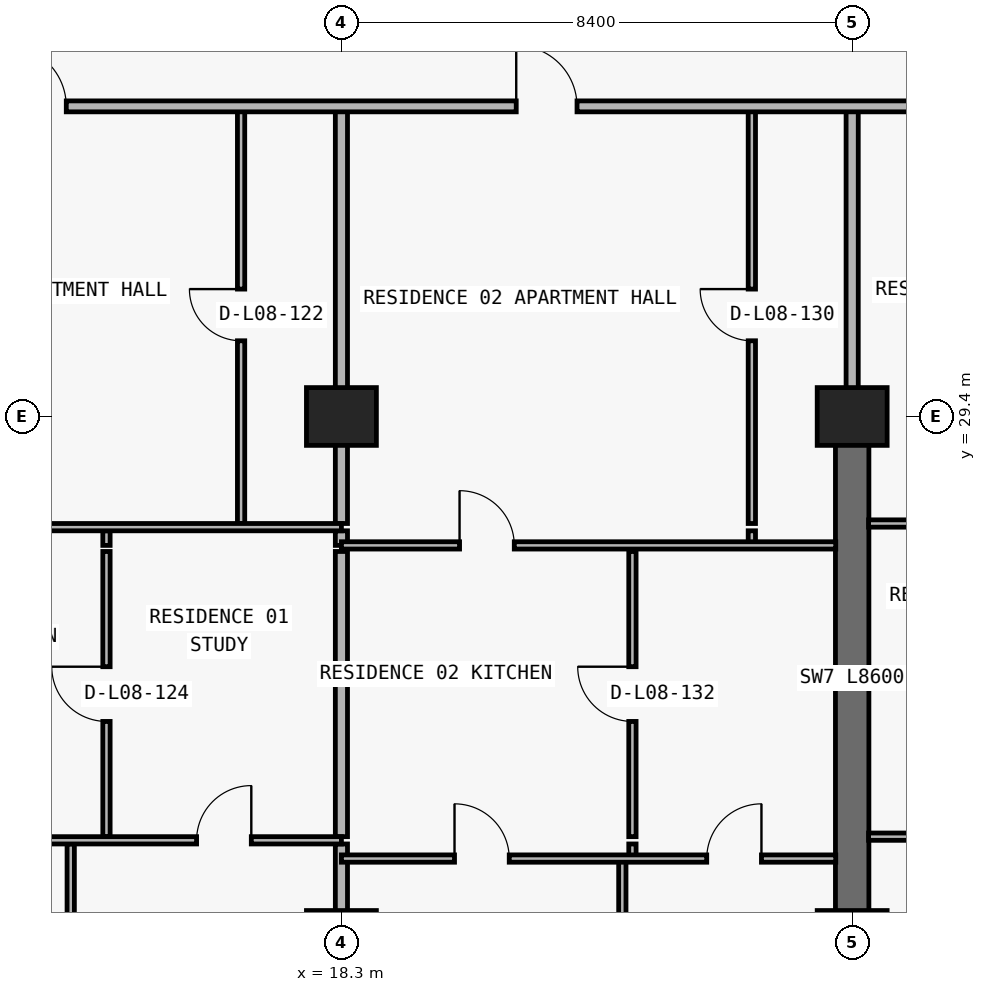
"""IFC4 building model, lengths in metres.
Left out: names, types, materials, properties, quantities, classifications, styles, units other than length and angle.
Written with IfcOpenShell. Run it as: python <this file> out.ifc"""

import sys

from ifc_helpers import new_model, si_unit, direction, frame, frame_2d, origin, origin_2d, place, context, subcontext, project, spatial, rectangle, extrude, element, fill, save


model = new_model("IFC4")
c1 = context("Model", 3, precision=1e-05, world=origin(), true_north=direction((0.0, 1.0)))
c2 = subcontext(c1, "Body", "Model", "MODEL_VIEW")
j1 = project(units=[si_unit("LENGTHUNIT", "METRE"), si_unit("PLANEANGLEUNIT", "RADIAN")], contexts=[c1])
p1 = place(None, origin())
s1 = spatial("IfcSite", under=j1, at=p1, CompositionType="ELEMENT")
p2 = place(p1, origin())
s2 = spatial("IfcBuilding", under=s1, at=p2, CompositionType="ELEMENT")
p3 = place(p2, frame((0.0, 0.0, 36.6)))
s3 = spatial("IfcBuildingStorey", under=s2, at=p3, CompositionType="ELEMENT", Elevation=36.6)
for number, where, z_axis, x_axis in (
    (1, (18.3, 20.8, 0.0), (0.0, 0.0, 1.0), (1.0, 0.0, 0.0)),
    (2, (26.7, 20.8, 0.0), (0.0, 0.0, 1.0), (1.0, 0.0, 0.0)),
    (3, (18.3, 29.4, 0.0), (0.0, 0.0, 1.0), (1.0, 0.0, 0.0)),
    (4, (26.7, 29.4, 0.0), (0.0, 0.0, 1.0), (1.0, 0.0, 0.0)),
):
    element("IfcColumn", number, at=place(p3, frame(where, z_axis=z_axis, x_axis=x_axis)), inside=s3, PredefinedType="COLUMN", context=c2, shape_type="SweptSolid", body=[
        extrude(rectangle(XDim=1.15, YDim=0.95, at=origin_2d()), origin(), (0.0, 0.0, 1.0), 3.05),
    ])
p4 = place(p3, frame((26.7, 20.8, 0.0), z_axis=(0.0, 0.0, 1.0), x_axis=(0.0, 1.0, 0.0)))
e5 = element("IfcWall", 5, at=p4, inside=s3, PredefinedType="SHEAR", context=c2, shape_type="SweptSolid", body=[
    extrude(rectangle(XDim=8.6, YDim=0.55, at=frame_2d((4.3, 0.0))), origin(), (0.0, 0.0, 1.0), 3.05),
])
p5 = place(p3, frame((13.848, 6.24, 0.0), z_axis=(0.0, 0.0, 1.0), x_axis=(0.0, 1.0, 0.0)))
e6 = element("IfcWall", 6, at=p5, inside=s3, PredefinedType="PARTITIONING", context=c2, shape_type="SweptSolid", body=[
    extrude(rectangle(XDim=16.13, YDim=0.12, at=frame_2d((8.065, 0.0))), origin(), (0.0, 0.0, 1.0), 3.05),
])
p6 = place(p3, frame((14.436, 22.49, 0.0), z_axis=(0.0, 0.0, 1.0), x_axis=(0.0, 1.0, 0.0)))
e7 = element("IfcWall", 7, at=p6, inside=s3, PredefinedType="PARTITIONING", context=c2, shape_type="SweptSolid", body=[
    extrude(rectangle(XDim=4.69, YDim=0.12, at=frame_2d((2.345, 0.0))), origin(), (0.0, 0.0, 1.0), 3.05),
])
p7 = place(p6, frame((1.895, 0.0, 0.0)))
e8 = element("IfcOpeningElement", 8, at=p7, cuts=e7, PredefinedType="OPENING", context=c2, shape_type="SweptSolid", body=[
    extrude(rectangle(XDim=0.9, YDim=2.15, at=frame_2d((0.45, 1.075))), frame((0.0, 0.07, 0.0), z_axis=(0.0, -1.0, 0.0), x_axis=(1.0, 0.0, 0.0)), (0.0, 0.0, 1.0), 0.14),
])
p8 = place(p3, frame((14.436, 27.28, 0.0), z_axis=(0.0, 0.0, 1.0), x_axis=(0.0, 1.0, 0.0)))
e9 = element("IfcWall", 9, at=p8, inside=s3, PredefinedType="PARTITIONING", context=c2, shape_type="SweptSolid", body=[
    extrude(rectangle(XDim=0.24, YDim=0.12, at=frame_2d((0.12, 0.0))), origin(), (0.0, 0.0, 1.0), 3.05),
])
p9 = place(p3, frame((16.65, 27.64, 0.0), z_axis=(0.0, 0.0, 1.0), x_axis=(0.0, 1.0, 0.0)))
e10 = element("IfcWall", 10, at=p9, inside=s3, PredefinedType="PARTITIONING", context=c2, shape_type="SweptSolid", body=[
    extrude(rectangle(XDim=6.86, YDim=0.12, at=frame_2d((3.43, 0.0))), origin(), (0.0, 0.0, 1.0), 3.05),
])
p10 = place(p9, frame((3.005, 0.0, 0.0)))
e11 = element("IfcOpeningElement", 11, at=p10, cuts=e10, PredefinedType="OPENING", context=c2, shape_type="SweptSolid", body=[
    extrude(rectangle(XDim=0.85, YDim=2.1, at=frame_2d((0.425, 1.05))), frame((0.0, 0.07, 0.0), z_axis=(0.0, -1.0, 0.0), x_axis=(1.0, 0.0, 0.0)), (0.0, 0.0, 1.0), 0.14),
])
p11 = place(p3, frame((18.3, 6.24, 0.0), z_axis=(0.0, 0.0, 1.0), x_axis=(0.0, 1.0, 0.0)))
e12 = element("IfcWall", 12, at=p11, inside=s3, PredefinedType="PARTITIONING", context=c2, shape_type="SweptSolid", body=[
    extrude(rectangle(XDim=16.13, YDim=0.2, at=frame_2d((8.065, 0.0))), origin(), (0.0, 0.0, 1.0), 2.11),
])
p12 = place(p3, frame((18.3, 22.49, 0.0), z_axis=(0.0, 0.0, 1.0), x_axis=(0.0, 1.0, 0.0)))
e13 = element("IfcWall", 13, at=p12, inside=s3, PredefinedType="PARTITIONING", context=c2, shape_type="SweptSolid", body=[
    extrude(rectangle(XDim=4.69, YDim=0.2, at=frame_2d((2.345, 0.0))), origin(), (0.0, 0.0, 1.0), 2.11),
])
p13 = place(p3, frame((18.3, 27.28, 0.0), z_axis=(0.0, 0.0, 1.0), x_axis=(0.0, 1.0, 0.0)))
e14 = element("IfcWall", 14, at=p13, inside=s3, PredefinedType="PARTITIONING", context=c2, shape_type="SweptSolid", body=[
    extrude(rectangle(XDim=0.24, YDim=0.2, at=frame_2d((0.12, 0.0))), origin(), (0.0, 0.0, 1.0), 2.11),
])
p14 = place(p3, frame((18.3, 27.64, 0.0), z_axis=(0.0, 0.0, 1.0), x_axis=(0.0, 1.0, 0.0)))
e15 = element("IfcWall", 15, at=p14, inside=s3, PredefinedType="PARTITIONING", context=c2, shape_type="SweptSolid", body=[
    extrude(rectangle(XDim=6.86, YDim=0.2, at=frame_2d((3.43, 0.0))), origin(), (0.0, 0.0, 1.0), 2.11),
])
p15 = place(p3, frame((22.92, 6.24, 0.0), z_axis=(0.0, 0.0, 1.0), x_axis=(0.0, 1.0, 0.0)))
e16 = element("IfcWall", 16, at=p15, inside=s3, PredefinedType="PARTITIONING", context=c2, shape_type="SweptSolid", body=[
    extrude(rectangle(XDim=15.89, YDim=0.12, at=frame_2d((7.945, 0.0))), origin(), (0.0, 0.0, 1.0), 3.05),
])
p16 = place(p3, frame((23.086, 22.135, 0.0), z_axis=(0.0, 0.0, 1.0), x_axis=(0.0, 1.0, 0.0)))
e17 = element("IfcWall", 17, at=p16, inside=s3, PredefinedType="PARTITIONING", context=c2, shape_type="SweptSolid", body=[
    extrude(rectangle(XDim=0.235, YDim=0.12, at=frame_2d((0.118, 0.0))), origin(), (0.0, 0.0, 1.0), 3.05),
])
p17 = place(p3, frame((23.086, 22.49, 0.0), z_axis=(0.0, 0.0, 1.0), x_axis=(0.0, 1.0, 0.0)))
e18 = element("IfcWall", 18, at=p17, inside=s3, PredefinedType="PARTITIONING", context=c2, shape_type="SweptSolid", body=[
    extrude(rectangle(XDim=4.69, YDim=0.12, at=frame_2d((2.345, 0.0))), origin(), (0.0, 0.0, 1.0), 3.05),
])
p18 = place(p17, frame((1.895, 0.0, 0.0)))
e19 = element("IfcOpeningElement", 19, at=p18, cuts=e18, PredefinedType="OPENING", context=c2, shape_type="SweptSolid", body=[
    extrude(rectangle(XDim=0.9, YDim=2.15, at=frame_2d((0.45, 1.075))), frame((0.0, 0.07, 0.0), z_axis=(0.0, -1.0, 0.0), x_axis=(1.0, 0.0, 0.0)), (0.0, 0.0, 1.0), 0.14),
])
p19 = place(p3, frame((25.05, 27.28, 0.0), z_axis=(0.0, 0.0, 1.0), x_axis=(0.0, 1.0, 0.0)))
e20 = element("IfcWall", 20, at=p19, inside=s3, PredefinedType="PARTITIONING", context=c2, shape_type="SweptSolid", body=[
    extrude(rectangle(XDim=0.24, YDim=0.12, at=frame_2d((0.12, 0.0))), origin(), (0.0, 0.0, 1.0), 3.05),
])
p20 = place(p3, frame((25.05, 27.64, 0.0), z_axis=(0.0, 0.0, 1.0), x_axis=(0.0, 1.0, 0.0)))
e21 = element("IfcWall", 21, at=p20, inside=s3, PredefinedType="PARTITIONING", context=c2, shape_type="SweptSolid", body=[
    extrude(rectangle(XDim=6.86, YDim=0.12, at=frame_2d((3.43, 0.0))), origin(), (0.0, 0.0, 1.0), 3.05),
])
p21 = place(p20, frame((3.005, 0.0, 0.0)))
e22 = element("IfcOpeningElement", 22, at=p21, cuts=e21, PredefinedType="OPENING", context=c2, shape_type="SweptSolid", body=[
    extrude(rectangle(XDim=0.85, YDim=2.1, at=frame_2d((0.425, 1.05))), frame((0.0, 0.07, 0.0), z_axis=(0.0, -1.0, 0.0), x_axis=(1.0, 0.0, 0.0)), (0.0, 0.0, 1.0), 0.14),
])
p22 = place(p3, frame((26.7, 29.405, 0.0), z_axis=(0.0, 0.0, 1.0), x_axis=(0.0, 1.0, 0.0)))
e23 = element("IfcWall", 23, at=p22, inside=s3, PredefinedType="PARTITIONING", context=c2, shape_type="SweptSolid", body=[
    extrude(rectangle(XDim=5.095, YDim=0.2, at=frame_2d((2.547, 0.0))), origin(), (0.0, 0.0, 1.0), 2.335),
])
p23 = place(p3, frame((18.3, 22.13, 0.0), z_axis=(0.0, 0.0, 1.0), x_axis=(1.0, 0.0, 0.0)))
e24 = element("IfcWall", 24, at=p23, inside=s3, PredefinedType="PARTITIONING", context=c2, shape_type="SweptSolid", body=[
    extrude(rectangle(XDim=8.13, YDim=0.12, at=frame_2d((4.065, 0.0))), origin(), (0.0, 0.0, 1.0), 3.05),
])
p24 = place(p23, frame((1.86, 0.0, 0.0)))
e25 = element("IfcOpeningElement", 25, at=p24, cuts=e24, PredefinedType="OPENING", context=c2, shape_type="SweptSolid", body=[
    extrude(rectangle(XDim=0.9, YDim=2.15, at=frame_2d((0.45, 1.075))), frame((0.0, 0.07, 0.0), z_axis=(0.0, -1.0, 0.0), x_axis=(1.0, 0.0, 0.0)), (0.0, 0.0, 1.0), 0.14),
])
p25 = place(p23, frame((6.008, 0.0, 0.0)))
e26 = element("IfcOpeningElement", 26, at=p25, cuts=e24, PredefinedType="OPENING", context=c2, shape_type="SweptSolid", body=[
    extrude(rectangle(XDim=0.9, YDim=2.15, at=frame_2d((0.45, 1.075))), frame((0.0, 0.07, 0.0), z_axis=(0.0, -1.0, 0.0), x_axis=(1.0, 0.0, 0.0)), (0.0, 0.0, 1.0), 0.14),
])
p26 = place(p3, frame((9.9, 22.43, 0.0), z_axis=(0.0, 0.0, 1.0), x_axis=(1.0, 0.0, 0.0)))
e27 = element("IfcWall", 27, at=p26, inside=s3, PredefinedType="PARTITIONING", context=c2, shape_type="SweptSolid", body=[
    extrude(rectangle(XDim=8.4, YDim=0.12, at=frame_2d((4.2, 0.0))), origin(), (0.0, 0.0, 1.0), 3.05),
])
p27 = place(p26, frame((1.524, 0.0, 0.0)))
e28 = element("IfcOpeningElement", 28, at=p27, cuts=e27, PredefinedType="OPENING", context=c2, shape_type="SweptSolid", body=[
    extrude(rectangle(XDim=0.9, YDim=2.15, at=frame_2d((0.45, 1.075))), frame((0.0, 0.07, 0.0), z_axis=(0.0, -1.0, 0.0), x_axis=(1.0, 0.0, 0.0)), (0.0, 0.0, 1.0), 0.14),
])
p28 = place(p26, frame((6.018, 0.0, 0.0)))
e29 = element("IfcOpeningElement", 29, at=p28, cuts=e27, PredefinedType="OPENING", context=c2, shape_type="SweptSolid", body=[
    extrude(rectangle(XDim=0.9, YDim=2.15, at=frame_2d((0.45, 1.075))), frame((0.0, 0.07, 0.0), z_axis=(0.0, -1.0, 0.0), x_axis=(1.0, 0.0, 0.0)), (0.0, 0.0, 1.0), 0.14),
])
p29 = place(p3, frame((26.97, 22.49, 0.0), z_axis=(0.0, 0.0, 1.0), x_axis=(1.0, 0.0, 0.0)))
e30 = element("IfcWall", 30, at=p29, inside=s3, PredefinedType="PARTITIONING", context=c2, shape_type="SweptSolid", body=[
    extrude(rectangle(XDim=8.125, YDim=0.12, at=frame_2d((4.062, 0.0))), origin(), (0.0, 0.0, 1.0), 3.05),
])
p30 = place(p29, frame((1.389, 0.0, 0.0)))
e31 = element("IfcOpeningElement", 31, at=p30, cuts=e30, PredefinedType="OPENING", context=c2, shape_type="SweptSolid", body=[
    extrude(rectangle(XDim=0.9, YDim=2.15, at=frame_2d((0.45, 1.075))), frame((0.0, 0.07, 0.0), z_axis=(0.0, -1.0, 0.0), x_axis=(1.0, 0.0, 0.0)), (0.0, 0.0, 1.0), 0.14),
])
p31 = place(p29, frame((5.621, 0.0, 0.0)))
e32 = element("IfcOpeningElement", 32, at=p31, cuts=e30, PredefinedType="OPENING", context=c2, shape_type="SweptSolid", body=[
    extrude(rectangle(XDim=0.9, YDim=2.15, at=frame_2d((0.45, 1.075))), frame((0.0, 0.07, 0.0), z_axis=(0.0, -1.0, 0.0), x_axis=(1.0, 0.0, 0.0)), (0.0, 0.0, 1.0), 0.14),
])
p32 = place(p3, frame((18.3, 27.28, 0.0), z_axis=(0.0, 0.0, 1.0), x_axis=(1.0, 0.0, 0.0)))
e33 = element("IfcWall", 33, at=p32, inside=s3, PredefinedType="PARTITIONING", context=c2, shape_type="SweptSolid", body=[
    extrude(rectangle(XDim=8.13, YDim=0.12, at=frame_2d((4.065, 0.0))), origin(), (0.0, 0.0, 1.0), 3.05),
])
p33 = place(p32, frame((1.943, 0.0, 0.0)))
e34 = element("IfcOpeningElement", 34, at=p33, cuts=e33, PredefinedType="OPENING", context=c2, shape_type="SweptSolid", body=[
    extrude(rectangle(XDim=0.9, YDim=2.15, at=frame_2d((0.45, 1.075))), frame((0.0, 0.07, 0.0), z_axis=(0.0, -1.0, 0.0), x_axis=(1.0, 0.0, 0.0)), (0.0, 0.0, 1.0), 0.14),
])
p34 = place(p3, frame((9.9, 27.58, 0.0), z_axis=(0.0, 0.0, 1.0), x_axis=(1.0, 0.0, 0.0)))
e35 = element("IfcWall", 35, at=p34, inside=s3, PredefinedType="PARTITIONING", context=c2, shape_type="SweptSolid", body=[
    extrude(rectangle(XDim=8.4, YDim=0.12, at=frame_2d((4.2, 0.0))), origin(), (0.0, 0.0, 1.0), 3.05),
])
p35 = place(p34, frame((1.818, 0.0, 0.0)))
e36 = element("IfcOpeningElement", 36, at=p35, cuts=e35, PredefinedType="OPENING", context=c2, shape_type="SweptSolid", body=[
    extrude(rectangle(XDim=0.9, YDim=2.15, at=frame_2d((0.45, 1.075))), frame((0.0, 0.07, 0.0), z_axis=(0.0, -1.0, 0.0), x_axis=(1.0, 0.0, 0.0)), (0.0, 0.0, 1.0), 0.14),
])
p36 = place(p3, frame((26.97, 27.64, 0.0), z_axis=(0.0, 0.0, 1.0), x_axis=(1.0, 0.0, 0.0)))
e37 = element("IfcWall", 37, at=p36, inside=s3, PredefinedType="PARTITIONING", context=c2, shape_type="SweptSolid", body=[
    extrude(rectangle(XDim=8.13, YDim=0.12, at=frame_2d((4.065, 0.0))), origin(), (0.0, 0.0, 1.0), 3.05),
])
p37 = place(p36, frame((1.558, 0.0, 0.0)))
e38 = element("IfcOpeningElement", 38, at=p37, cuts=e37, PredefinedType="OPENING", context=c2, shape_type="SweptSolid", body=[
    extrude(rectangle(XDim=0.9, YDim=2.15, at=frame_2d((0.45, 1.075))), frame((0.0, 0.07, 0.0), z_axis=(0.0, -1.0, 0.0), x_axis=(1.0, 0.0, 0.0)), (0.0, 0.0, 1.0), 0.14),
])
p38 = place(p3, frame((5.105, 34.5, 0.0), z_axis=(0.0, 0.0, 1.0), x_axis=(1.0, 0.0, 0.0)))
e39 = element("IfcWall", 39, at=p38, inside=s3, PredefinedType="PARTITIONING", context=c2, shape_type="SweptSolid", body=[
    extrude(rectangle(XDim=50.781, YDim=0.18, at=frame_2d((25.391, 0.0))), origin(), (0.0, 0.0, 1.0), 3.05),
])
p39 = place(p38, frame((7.67, 0.0, 0.0)))
e40 = element("IfcOpeningElement", 40, at=p39, cuts=e39, PredefinedType="OPENING", context=c2, shape_type="SweptSolid", body=[
    extrude(rectangle(XDim=1.0, YDim=2.2, at=frame_2d((0.5, 1.1))), frame((0.0, 0.1, 0.0), z_axis=(0.0, -1.0, 0.0), x_axis=(1.0, 0.0, 0.0)), (0.0, 0.0, 1.0), 0.2),
])
p40 = place(p38, frame((16.07, 0.0, 0.0)))
e41 = element("IfcOpeningElement", 41, at=p40, cuts=e39, PredefinedType="OPENING", context=c2, shape_type="SweptSolid", body=[
    extrude(rectangle(XDim=1.0, YDim=2.2, at=frame_2d((0.5, 1.1))), frame((0.0, 0.1, 0.0), z_axis=(0.0, -1.0, 0.0), x_axis=(1.0, 0.0, 0.0)), (0.0, 0.0, 1.0), 0.2),
])
p41 = place(p38, frame((24.47, 0.0, 0.0)))
e42 = element("IfcOpeningElement", 42, at=p41, cuts=e39, PredefinedType="OPENING", context=c2, shape_type="SweptSolid", body=[
    extrude(rectangle(XDim=1.0, YDim=2.2, at=frame_2d((0.5, 1.1))), frame((0.0, 0.1, 0.0), z_axis=(0.0, -1.0, 0.0), x_axis=(1.0, 0.0, 0.0)), (0.0, 0.0, 1.0), 0.2),
])
p42 = place(p38, frame((32.545, 0.0, 0.0)))
e43 = element("IfcOpeningElement", 43, at=p42, cuts=e39, PredefinedType="OPENING", context=c2, shape_type="SweptSolid", body=[
    extrude(rectangle(XDim=1.0, YDim=2.2, at=frame_2d((0.5, 1.1))), frame((0.0, 0.1, 0.0), z_axis=(0.0, -1.0, 0.0), x_axis=(1.0, 0.0, 0.0)), (0.0, 0.0, 1.0), 0.2),
])
p43 = place(p38, frame((47.888, 0.0, 0.0)))
e44 = element("IfcOpeningElement", 44, at=p43, cuts=e39, PredefinedType="OPENING", context=c2, shape_type="SweptSolid", body=[
    extrude(rectangle(XDim=1.0, YDim=2.2, at=frame_2d((0.5, 1.1))), frame((0.0, 0.1, 0.0), z_axis=(0.0, -1.0, 0.0), x_axis=(1.0, 0.0, 0.0)), (0.0, 0.0, 1.0), 0.2),
])
p44 = place(p39, origin())
e45 = element("IfcDoor", 45, at=p44, inside=s3, OperationType="SINGLE_SWING_LEFT", PredefinedType="DOOR", context=c2, shape_type="SweptSolid", body=[
    extrude(rectangle(XDim=1.0, YDim=2.2, at=frame_2d((0.5, 1.1))), frame((0.0, 0.025, 0.0), z_axis=(0.0, -1.0, 0.0), x_axis=(1.0, 0.0, 0.0)), (0.0, 0.0, 1.0), 0.05),
])
fill(e40, e45)
p45 = place(p10, origin())
e46 = element("IfcDoor", 46, at=p45, inside=s3, OperationType="SINGLE_SWING_RIGHT", PredefinedType="DOOR", context=c2, shape_type="SweptSolid", body=[
    extrude(rectangle(XDim=0.85, YDim=2.1, at=frame_2d((0.425, 1.05))), frame((0.0, 0.025, 0.0), z_axis=(0.0, -1.0, 0.0), x_axis=(1.0, 0.0, 0.0)), (0.0, 0.0, 1.0), 0.05),
])
fill(e11, e46)
p46 = place(p7, origin())
e47 = element("IfcDoor", 47, at=p46, inside=s3, OperationType="SINGLE_SWING_RIGHT", PredefinedType="DOOR", context=c2, shape_type="SweptSolid", body=[
    extrude(rectangle(XDim=0.9, YDim=2.15, at=frame_2d((0.45, 1.075))), frame((0.0, 0.025, 0.0), z_axis=(0.0, -1.0, 0.0), x_axis=(1.0, 0.0, 0.0)), (0.0, 0.0, 1.0), 0.05),
])
fill(e8, e47)
p47 = place(p28, origin())
e48 = element("IfcDoor", 48, at=p47, inside=s3, OperationType="SINGLE_SWING_RIGHT", PredefinedType="DOOR", context=c2, shape_type="SweptSolid", body=[
    extrude(rectangle(XDim=0.9, YDim=2.15, at=frame_2d((0.45, 1.075))), frame((0.0, 0.025, 0.0), z_axis=(0.0, -1.0, 0.0), x_axis=(1.0, 0.0, 0.0)), (0.0, 0.0, 1.0), 0.05),
])
fill(e29, e48)
p48 = place(p40, origin())
e49 = element("IfcDoor", 49, at=p48, inside=s3, OperationType="SINGLE_SWING_LEFT", PredefinedType="DOOR", context=c2, shape_type="SweptSolid", body=[
    extrude(rectangle(XDim=1.0, YDim=2.2, at=frame_2d((0.5, 1.1))), frame((0.0, 0.025, 0.0), z_axis=(0.0, -1.0, 0.0), x_axis=(1.0, 0.0, 0.0)), (0.0, 0.0, 1.0), 0.05),
])
fill(e41, e49)
p49 = place(p21, origin())
e50 = element("IfcDoor", 50, at=p49, inside=s3, OperationType="SINGLE_SWING_RIGHT", PredefinedType="DOOR", context=c2, shape_type="SweptSolid", body=[
    extrude(rectangle(XDim=0.85, YDim=2.1, at=frame_2d((0.425, 1.05))), frame((0.0, 0.025, 0.0), z_axis=(0.0, -1.0, 0.0), x_axis=(1.0, 0.0, 0.0)), (0.0, 0.0, 1.0), 0.05),
])
fill(e22, e50)
p50 = place(p33, origin())
e51 = element("IfcDoor", 51, at=p50, inside=s3, OperationType="SINGLE_SWING_LEFT", PredefinedType="DOOR", context=c2, shape_type="SweptSolid", body=[
    extrude(rectangle(XDim=0.9, YDim=2.15, at=frame_2d((0.45, 1.075))), frame((0.0, 0.025, 0.0), z_axis=(0.0, -1.0, 0.0), x_axis=(1.0, 0.0, 0.0)), (0.0, 0.0, 1.0), 0.05),
])
fill(e34, e51)
p51 = place(p18, origin())
e52 = element("IfcDoor", 52, at=p51, inside=s3, OperationType="SINGLE_SWING_RIGHT", PredefinedType="DOOR", context=c2, shape_type="SweptSolid", body=[
    extrude(rectangle(XDim=0.9, YDim=2.15, at=frame_2d((0.45, 1.075))), frame((0.0, 0.025, 0.0), z_axis=(0.0, -1.0, 0.0), x_axis=(1.0, 0.0, 0.0)), (0.0, 0.0, 1.0), 0.05),
])
fill(e19, e52)
p52 = place(p24, origin())
e53 = element("IfcDoor", 53, at=p52, inside=s3, OperationType="SINGLE_SWING_LEFT", PredefinedType="DOOR", context=c2, shape_type="SweptSolid", body=[
    extrude(rectangle(XDim=0.9, YDim=2.15, at=frame_2d((0.45, 1.075))), frame((0.0, 0.025, 0.0), z_axis=(0.0, -1.0, 0.0), x_axis=(1.0, 0.0, 0.0)), (0.0, 0.0, 1.0), 0.05),
])
fill(e25, e53)
p53 = place(p25, origin())
e54 = element("IfcDoor", 54, at=p53, inside=s3, OperationType="SINGLE_SWING_RIGHT", PredefinedType="DOOR", context=c2, shape_type="SweptSolid", body=[
    extrude(rectangle(XDim=0.9, YDim=2.15, at=frame_2d((0.45, 1.075))), frame((0.0, 0.025, 0.0), z_axis=(0.0, -1.0, 0.0), x_axis=(1.0, 0.0, 0.0)), (0.0, 0.0, 1.0), 0.05),
])
fill(e26, e54)
save(model, sys.argv[1])
